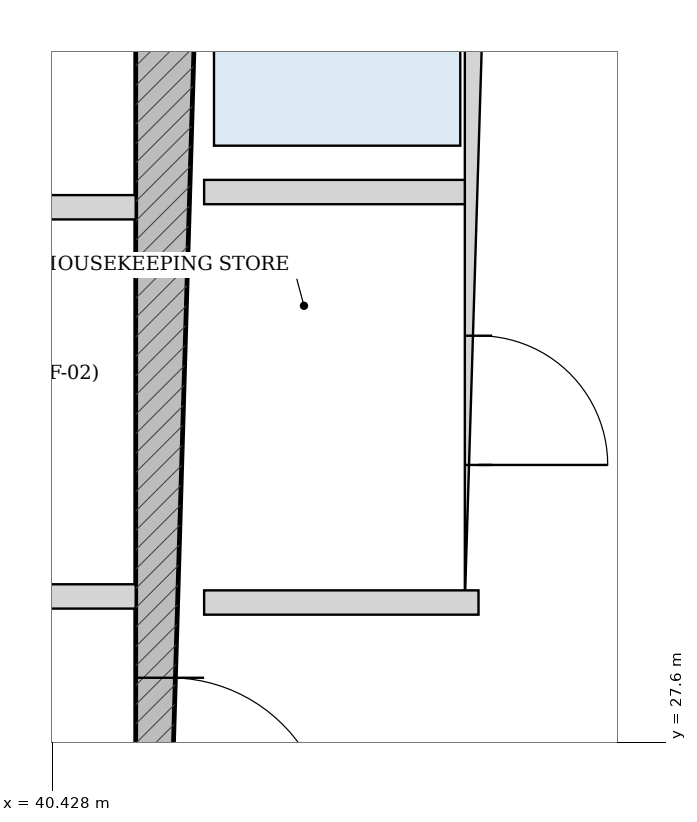
"""IFC4 building model, lengths in metres.
Left out: names, types, materials, properties, quantities, classifications, styles, units other than length and angle.
Written with IfcOpenShell. Run it as: python <this file> out.ifc"""

import sys

from ifc_helpers import new_model, si_unit, direction, frame, frame_2d, origin, place, context, subcontext, project, spatial, rectangle, extrude, source, transform, mapped, element, fill, save


model = new_model("IFC4")
c1 = context("Model", 3, precision=1e-05, world=origin(), true_north=direction((-0.2419218956, 0.970295726276)))
c2 = subcontext(c1, "Body", "Model", "MODEL_VIEW")
j1 = project(units=[si_unit("LENGTHUNIT", "METRE"), si_unit("PLANEANGLEUNIT", "RADIAN")], contexts=[c1])
p1 = place(None, origin())
s1 = spatial("IfcSite", under=j1, at=p1, CompositionType="ELEMENT")
p2 = place(p1, origin())
s2 = spatial("IfcBuilding", under=s1, at=p2, CompositionType="ELEMENT")
p3 = place(p2, frame((0.0, 0.0, 112.2)))
s3 = spatial("IfcBuildingStorey", under=s2, at=p3, CompositionType="ELEMENT", Elevation=112.2)
p4 = place(p3, frame((41.2, 19.175, 0.0), z_axis=(0.0, 0.0, 1.0), x_axis=(0.0, 1.0, 0.0)))
e1 = element("IfcWall", 1, at=p4, inside=s3, PredefinedType="SHEAR", context=c2, shape_type="SweptSolid", body=[
    extrude(rectangle(XDim=15.25, YDim=0.45, at=frame_2d((7.625, 0.0))), origin(), (0.0, 0.0, 1.0), 3.325),
])
p5 = place(p4, frame((7.8, 0.0, 0.0)))
e2 = element("IfcOpeningElement", 2, at=p5, cuts=e1, PredefinedType="OPENING", context=c2, shape_type="SweptSolid", body=[
    extrude(rectangle(XDim=1.05, YDim=2.15, at=frame_2d((0.525, 1.075))), frame((0.0, 0.235, 0.0), z_axis=(0.0, -1.0, 0.0), x_axis=(1.0, 0.0, 0.0)), (0.0, 0.0, 1.0), 0.47),
])
p6 = place(p3, frame((43.23, 28.52, 0.0), z_axis=(0.0, 0.0, 1.0), x_axis=(0.0, 1.0, 0.0)))
e3 = element("IfcWall", 3, at=p6, inside=s3, PredefinedType="PARTITIONING", context=c2, shape_type="SweptSolid", body=[
    extrude(rectangle(XDim=5.905, YDim=0.18, at=frame_2d((2.953, 0.0))), origin(), (0.0, 0.0, 1.0), 3.325),
])
p7 = place(p6, frame((0.905, 0.0, 0.0)))
e4 = element("IfcOpeningElement", 4, at=p7, cuts=e3, PredefinedType="OPENING", context=c2, shape_type="SweptSolid", body=[
    extrude(rectangle(XDim=0.85, YDim=2.1, at=frame_2d((0.425, 1.05))), frame((0.0, 0.1, 0.0), z_axis=(0.0, -1.0, 0.0), x_axis=(1.0, 0.0, 0.0)), (0.0, 0.0, 1.0), 0.2),
])
p8 = place(p6, frame((3.655, 0.0, 0.0)))
e5 = element("IfcOpeningElement", 5, at=p8, cuts=e3, PredefinedType="OPENING", context=c2, shape_type="SweptSolid", body=[
    extrude(rectangle(XDim=1.15, YDim=2.2, at=frame_2d((0.575, 1.1))), frame((0.0, 0.1, 0.0), z_axis=(0.0, -1.0, 0.0), x_axis=(1.0, 0.0, 0.0)), (0.0, 0.0, 1.0), 0.2),
])
p9 = place(p3, frame((41.425, 31.22, 0.0), z_axis=(0.0, 0.0, 1.0), x_axis=(1.0, 0.0, 0.0)))
e6 = element("IfcWall", 6, at=p9, inside=s3, PredefinedType="PARTITIONING", context=c2, shape_type="SweptSolid", body=[
    extrude(rectangle(XDim=1.715, YDim=0.16, at=frame_2d((0.857, 0.0))), origin(), (0.0, 0.0, 1.0), 3.325),
])
p10 = place(p3, frame((41.425, 28.52, 0.0), z_axis=(0.0, 0.0, 1.0), x_axis=(1.0, 0.0, 0.0)))
e7 = element("IfcWall", 7, at=p10, inside=s3, PredefinedType="PARTITIONING", context=c2, shape_type="SweptSolid", body=[
    extrude(rectangle(XDim=1.805, YDim=0.16, at=frame_2d((0.902, 0.0))), origin(), (0.0, 0.0, 1.0), 3.325),
])
p11 = place(p3, frame((35.025, 28.56, 0.0), z_axis=(0.0, 0.0, 1.0), x_axis=(1.0, 0.0, 0.0)))
e8 = element("IfcWall", 8, at=p11, inside=s3, PredefinedType="PARTITIONING", context=c2, shape_type="SweptSolid", body=[
    extrude(rectangle(XDim=5.95, YDim=0.16, at=frame_2d((2.975, 0.0))), origin(), (0.0, 0.0, 1.0), 3.325),
])
p12 = place(p11, frame((0.76, 0.0, 0.0)))
e9 = element("IfcOpeningElement", 9, at=p12, cuts=e8, PredefinedType="OPENING", context=c2, shape_type="SweptSolid", body=[
    extrude(rectangle(XDim=1.1, YDim=2.2, at=frame_2d((0.55, 1.1))), frame((0.0, 0.09, 0.0), z_axis=(0.0, -1.0, 0.0), x_axis=(1.0, 0.0, 0.0)), (0.0, 0.0, 1.0), 0.18),
])
p13 = place(p11, frame((2.425, 0.0, 0.0)))
e10 = element("IfcOpeningElement", 10, at=p13, cuts=e8, PredefinedType="OPENING", context=c2, shape_type="SweptSolid", body=[
    extrude(rectangle(XDim=1.1, YDim=2.2, at=frame_2d((0.55, 1.1))), frame((0.0, 0.09, 0.0), z_axis=(0.0, -1.0, 0.0), x_axis=(1.0, 0.0, 0.0)), (0.0, 0.0, 1.0), 0.18),
])
p14 = place(p11, frame((4.09, 0.0, 0.0)))
e11 = element("IfcOpeningElement", 11, at=p14, cuts=e8, PredefinedType="OPENING", context=c2, shape_type="SweptSolid", body=[
    extrude(rectangle(XDim=1.1, YDim=2.2, at=frame_2d((0.55, 1.1))), frame((0.0, 0.09, 0.0), z_axis=(0.0, -1.0, 0.0), x_axis=(1.0, 0.0, 0.0)), (0.0, 0.0, 1.0), 0.18),
])
p15 = place(p3, frame((35.025, 31.12, 0.0), z_axis=(0.0, 0.0, 1.0), x_axis=(1.0, 0.0, 0.0)))
e12 = element("IfcWall", 12, at=p15, inside=s3, PredefinedType="PARTITIONING", context=c2, shape_type="SweptSolid", body=[
    extrude(rectangle(XDim=5.95, YDim=0.16, at=frame_2d((2.975, 0.0))), origin(), (0.0, 0.0, 1.0), 3.325),
])
m1 = source(origin(), c2, "Body", "SweptSolid", [
    extrude(rectangle(XDim=1.05, YDim=2.15, at=frame_2d((0.525, 1.075))), frame((0.0, 0.025, 0.0), z_axis=(0.0, -1.0, 0.0), x_axis=(1.0, 0.0, 0.0)), (0.0, 0.0, 1.0), 0.05),
])
p16 = place(p5, frame((1.05, 0.0, 0.0), z_axis=(0.0, 0.0, 1.0), x_axis=(-1.0, 0.0, 0.0)))
e13 = element("IfcDoor", 13, at=p16, inside=s3, OperationType="SINGLE_SWING_RIGHT", PredefinedType="DOOR", context=c2, shape_type="MappedRepresentation", body=[
    mapped(m1, transform((0.0, 0.0, 0.0), scale=1.0)),
])
fill(e2, e13)
m2 = source(origin(), c2, "Body", "SweptSolid", [
    extrude(rectangle(XDim=0.85, YDim=2.1, at=frame_2d((0.425, 1.05))), frame((0.0, 0.025, 0.0), z_axis=(0.0, -1.0, 0.0), x_axis=(1.0, 0.0, 0.0)), (0.0, 0.0, 1.0), 0.05),
])
p17 = place(p7, frame((0.85, 0.0, 0.0), z_axis=(0.0, 0.0, 1.0), x_axis=(-1.0, 0.0, 0.0)))
e14 = element("IfcDoor", 14, at=p17, inside=s3, OperationType="SINGLE_SWING_RIGHT", PredefinedType="DOOR", context=c2, shape_type="MappedRepresentation", body=[
    mapped(m2, transform((0.0, 0.0, 0.0), scale=1.0)),
])
fill(e4, e14)
save(model, sys.argv[1])
